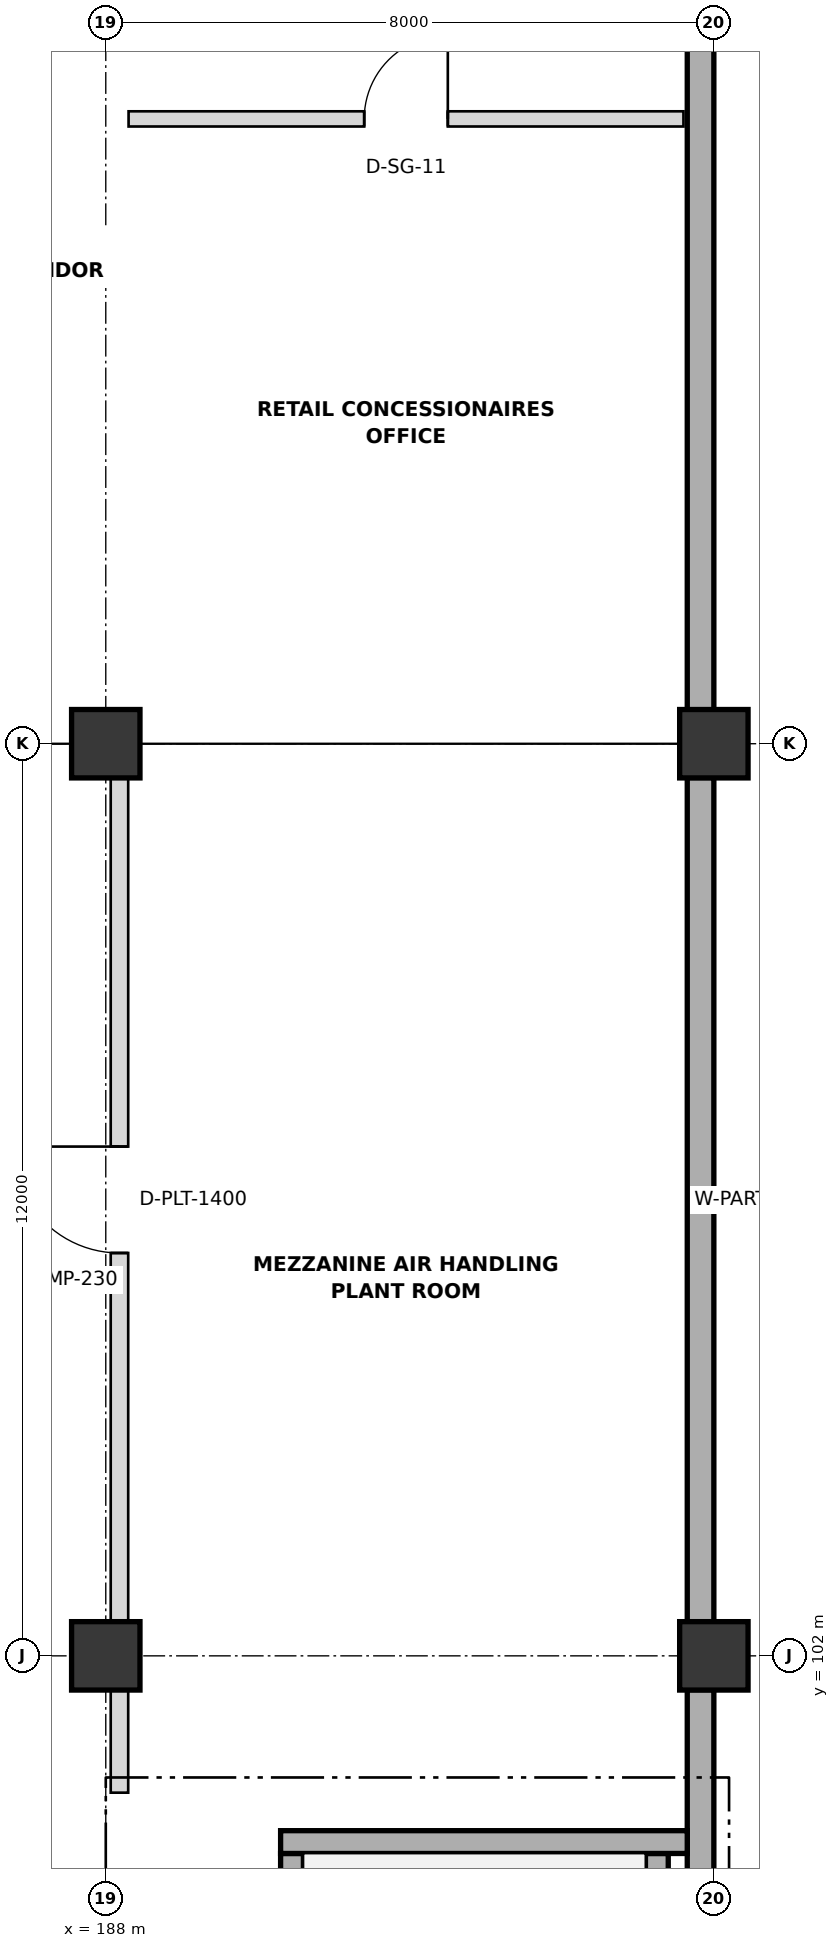
"""IFC4 building model, lengths in metres.
Left out: names, types, materials, properties, quantities, classifications, styles, units other than length and angle.
Written with IfcOpenShell. Run it as: python <this file> out.ifc"""

import sys

from ifc_helpers import new_model, si_unit, direction, frame, frame_2d, origin, origin_2d, place, context, subcontext, project, spatial, rectangle, extrude, element, fill, save


model = new_model("IFC4")
c1 = context("Model", 3, precision=1e-05, world=origin(), true_north=direction((0.0, 1.0)))
c2 = subcontext(c1, "Body", "Model", "MODEL_VIEW")
j1 = project(units=[si_unit("LENGTHUNIT", "METRE"), si_unit("PLANEANGLEUNIT", "RADIAN")], contexts=[c1])
p1 = place(None, origin())
s1 = spatial("IfcSite", under=j1, at=p1, CompositionType="ELEMENT")
p2 = place(p1, origin())
s2 = spatial("IfcBuilding", under=s1, at=p2, CompositionType="ELEMENT")
p3 = place(p2, frame((0.0, 0.0, 5.4)))
s3 = spatial("IfcBuildingStorey", under=s2, at=p3, CompositionType="ELEMENT", Elevation=5.4)
for number, where, z_axis, x_axis in (
    (1, (188.0, 102.0, 0.0), (0.0, 0.0, 1.0), (1.0, 0.0, 0.0)),
    (2, (188.0, 114.0, 0.0), (0.0, 0.0, 1.0), (1.0, 0.0, 0.0)),
    (3, (196.0, 102.0, 0.0), (0.0, 0.0, 1.0), (1.0, 0.0, 0.0)),
    (4, (196.0, 114.0, 0.0), (0.0, 0.0, 1.0), (1.0, 0.0, 0.0)),
):
    element("IfcColumn", number, at=place(p3, frame(where, z_axis=z_axis, x_axis=x_axis)), inside=s3, PredefinedType="COLUMN", context=c2, shape_type="SweptSolid", body=[
        extrude(rectangle(XDim=0.9, YDim=0.9, at=origin_2d()), origin(), (0.0, 0.0, 1.0), 4.2),
    ])
for number, where, z_axis, x_axis in (
    (5, (195.825, 101.555, 0.0), (0.0, 0.0, 1.0), (0.0, -1.0, 0.0)),
    (6, (195.825, 113.555, 0.0), (0.0, 0.0, 1.0), (0.0, -1.0, 0.0)),
    (7, (195.825, 125.555, 0.0), (0.0, 0.0, 1.0), (0.0, -1.0, 0.0)),
):
    element("IfcWall", number, at=place(p3, frame(where, z_axis=z_axis, x_axis=x_axis)), inside=s3, PredefinedType="SOLIDWALL", context=c2, shape_type="SweptSolid", body=[
        extrude(rectangle(XDim=11.11, YDim=0.35, at=frame_2d((5.555, 0.0))), origin(), (0.0, 0.0, 1.0), 4.2),
    ])
for number, where, z_axis, x_axis in (
    (8, (190.45, 90.8, 0.0), (0.0, 0.0, 1.0), (0.0, 1.0, 0.0)),
    (9, (195.25, 99.4, 0.0), (0.0, 0.0, 1.0), (0.0, -1.0, 0.0)),
):
    element("IfcWall", number, at=place(p3, frame(where, z_axis=z_axis, x_axis=x_axis)), inside=s3, PredefinedType="SHEAR", context=c2, shape_type="SweptSolid", body=[
        extrude(rectangle(XDim=8.6, YDim=0.3, at=frame_2d((4.3, 0.0))), origin(), (0.0, 0.0, 1.0), 4.2),
    ])
p4 = place(p3, frame((190.3, 99.55, 0.0), z_axis=(0.0, 0.0, 1.0), x_axis=(1.0, 0.0, 0.0)))
e10 = element("IfcWall", 10, at=p4, inside=s3, PredefinedType="SHEAR", context=c2, shape_type="SweptSolid", body=[
    extrude(rectangle(XDim=5.35, YDim=0.3, at=frame_2d((2.675, 0.0))), origin(), (0.0, 0.0, 1.0), 4.2),
])
p5 = place(p3, frame((188.3, 122.22, 0.0), z_axis=(0.0, 0.0, 1.0), x_axis=(1.0, 0.0, 0.0)))
e11 = element("IfcWall", 11, at=p5, inside=s3, PredefinedType="PARTITIONING", context=c2, shape_type="SweptSolid", body=[
    extrude(rectangle(XDim=7.3, YDim=0.2, at=frame_2d((3.65, 0.0))), origin(), (0.0, 0.0, 1.0), 3.118),
])
p6 = place(p5, frame((3.1, 0.0, 0.0)))
e12 = element("IfcOpeningElement", 12, at=p6, cuts=e11, PredefinedType="OPENING", context=c2, shape_type="SweptSolid", body=[
    extrude(rectangle(XDim=1.1, YDim=2.2, at=frame_2d((0.55, 1.1))), frame((0.0, 0.11, 0.0), z_axis=(0.0, -1.0, 0.0), x_axis=(1.0, 0.0, 0.0)), (0.0, 0.0, 1.0), 0.22),
])
p7 = place(p3, frame((188.18, 100.2, 0.0), z_axis=(0.0, 0.0, 1.0), x_axis=(0.0, 1.0, 0.0)))
e13 = element("IfcWall", 13, at=p7, inside=s3, PredefinedType="PARTITIONING", context=c2, shape_type="SweptSolid", body=[
    extrude(rectangle(XDim=13.5, YDim=0.23, at=frame_2d((6.75, 0.0))), origin(), (0.0, 0.0, 1.0), 3.018),
])
p8 = place(p7, frame((7.1, 0.0, 0.0)))
e14 = element("IfcOpeningElement", 14, at=p8, cuts=e13, PredefinedType="OPENING", context=c2, shape_type="SweptSolid", body=[
    extrude(rectangle(XDim=1.4, YDim=2.2, at=frame_2d((0.7, 1.1))), frame((0.0, 0.125, 0.0), z_axis=(0.0, -1.0, 0.0), x_axis=(1.0, 0.0, 0.0)), (0.0, 0.0, 1.0), 0.25),
])
p9 = place(p6, origin())
e15 = element("IfcDoor", 15, at=p9, inside=s3, OperationType="SINGLE_SWING_RIGHT", PredefinedType="DOOR", context=c2, shape_type="SweptSolid", body=[
    extrude(rectangle(XDim=1.1, YDim=2.2, at=frame_2d((0.55, 1.1))), frame((0.0, 0.025, 0.0), z_axis=(0.0, -1.0, 0.0), x_axis=(1.0, 0.0, 0.0)), (0.0, 0.0, 1.0), 0.05),
])
fill(e12, e15)
p10 = place(p8, origin())
e16 = element("IfcDoor", 16, at=p10, inside=s3, OperationType="SINGLE_SWING_RIGHT", PredefinedType="DOOR", context=c2, shape_type="SweptSolid", body=[
    extrude(rectangle(XDim=1.4, YDim=2.2, at=frame_2d((0.7, 1.1))), frame((0.0, 0.025, 0.0), z_axis=(0.0, -1.0, 0.0), x_axis=(1.0, 0.0, 0.0)), (0.0, 0.0, 1.0), 0.05),
])
fill(e14, e16)
save(model, sys.argv[1])
